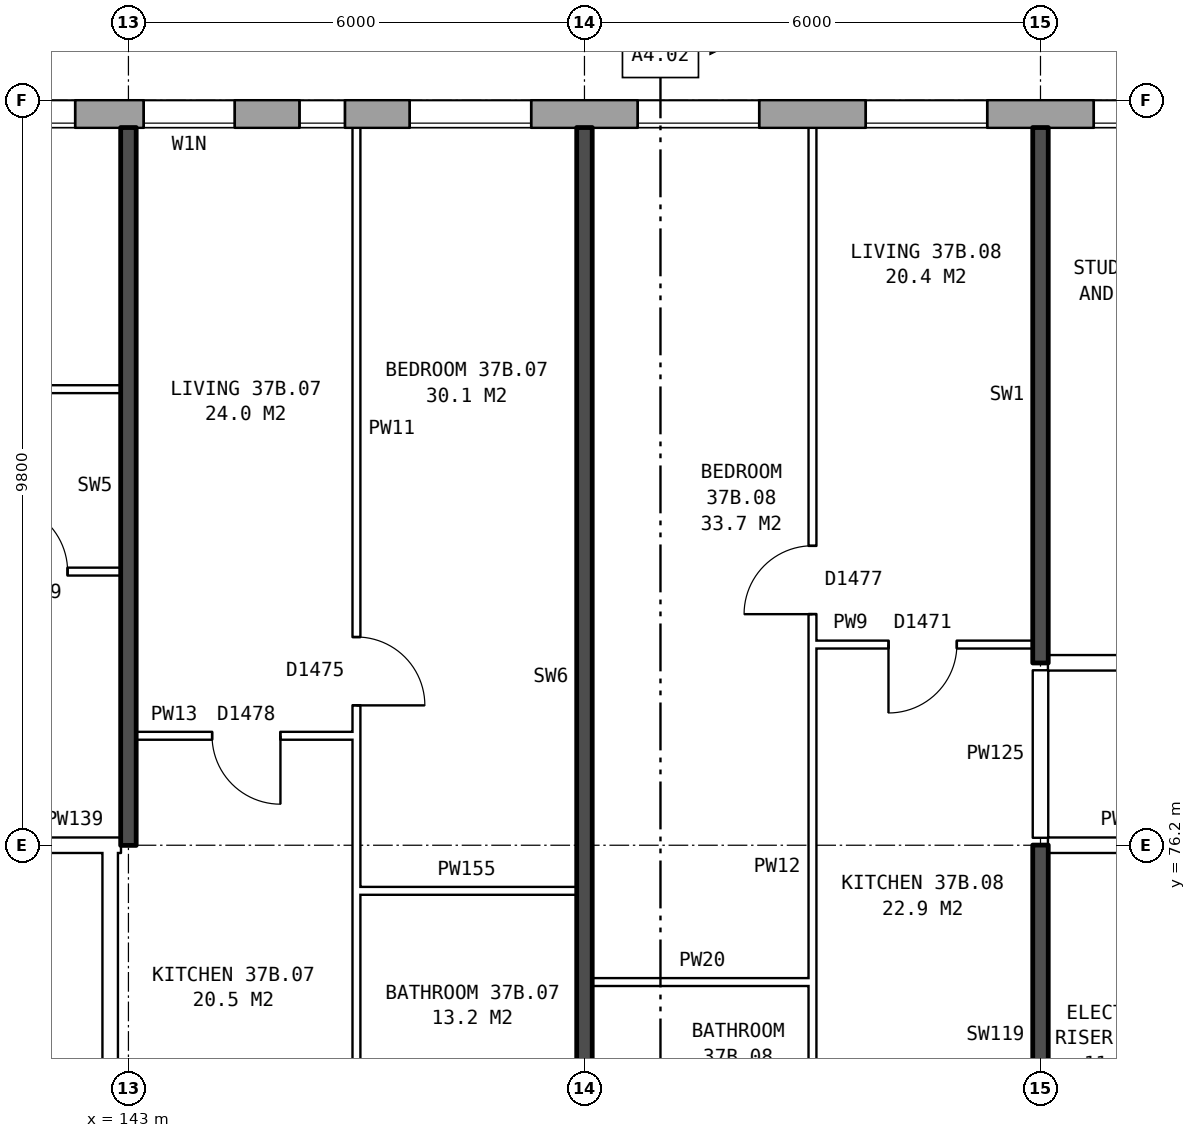
"""IFC4 building model, lengths in metres.
Left out: names, types, materials, properties, quantities, classifications, styles, units other than length and angle.
Written with IfcOpenShell. Run it as: python <this file> out.ifc"""

import sys

from ifc_helpers import new_model, si_unit, direction, frame, frame_2d, origin, place, context, subcontext, project, spatial, rectangle, extrude, element, fill, save


model = new_model("IFC4")
c1 = context("Model", 3, precision=1e-05, world=origin(), true_north=direction((0.0, 1.0)))
c2 = subcontext(c1, "Body", "Model", "MODEL_VIEW")
j1 = project(units=[si_unit("LENGTHUNIT", "METRE"), si_unit("PLANEANGLEUNIT", "RADIAN")], contexts=[c1])
p1 = place(None, origin())
s1 = spatial("IfcSite", under=j1, at=p1, CompositionType="ELEMENT")
p2 = place(p1, origin())
s2 = spatial("IfcBuilding", under=s1, at=p2, CompositionType="ELEMENT")
p3 = place(p2, frame((0.0, 0.0, 133.0)))
s3 = spatial("IfcBuildingStorey", under=s2, at=p3, CompositionType="ELEMENT", Elevation=133.0)
p4 = place(p3, frame((169.675, 85.82, 0.0), z_axis=(0.0, 0.0, 1.0), x_axis=(-1.0, 0.0, 0.0)))
e1 = element("IfcWall", 1, at=p4, inside=s3, PredefinedType="STANDARD", context=c2, shape_type="SweptSolid", body=[
    extrude(rectangle(XDim=35.601, YDim=0.36, at=frame_2d((17.8, 0.0))), origin(), (0.0, 0.0, 1.0), 2.85),
])
p5 = place(p4, frame((0.375, 0.0, 0.8)))
e2 = element("IfcOpeningElement", 2, at=p5, cuts=e1, PredefinedType="OPENING", context=c2, shape_type="SweptSolid", body=[
    extrude(rectangle(XDim=1.6, YDim=1.8, at=frame_2d((0.8, 0.9))), frame((0.0, 0.19, 0.0), z_axis=(0.0, -1.0, 0.0), x_axis=(1.0, 0.0, 0.0)), (0.0, 0.0, 1.0), 0.38),
])
p6 = place(p4, frame((3.375, 0.0, 0.8)))
e3 = element("IfcOpeningElement", 3, at=p6, cuts=e1, PredefinedType="OPENING", context=c2, shape_type="SweptSolid", body=[
    extrude(rectangle(XDim=1.6, YDim=1.8, at=frame_2d((0.8, 0.9))), frame((0.0, 0.19, 0.0), z_axis=(0.0, -1.0, 0.0), x_axis=(1.0, 0.0, 0.0)), (0.0, 0.0, 1.0), 0.38),
])
p7 = place(p4, frame((6.375, 0.0, 0.8)))
e4 = element("IfcOpeningElement", 4, at=p7, cuts=e1, PredefinedType="OPENING", context=c2, shape_type="SweptSolid", body=[
    extrude(rectangle(XDim=1.6, YDim=1.8, at=frame_2d((0.8, 0.9))), frame((0.0, 0.19, 0.0), z_axis=(0.0, -1.0, 0.0), x_axis=(1.0, 0.0, 0.0)), (0.0, 0.0, 1.0), 0.38),
])
p8 = place(p4, frame((8.875, 0.0, 0.8)))
e5 = element("IfcOpeningElement", 5, at=p8, cuts=e1, PredefinedType="OPENING", context=c2, shape_type="SweptSolid", body=[
    extrude(rectangle(XDim=0.8, YDim=1.8, at=frame_2d((0.4, 0.9))), frame((0.0, 0.19, 0.0), z_axis=(0.0, -1.0, 0.0), x_axis=(1.0, 0.0, 0.0)), (0.0, 0.0, 1.0), 0.38),
])
p9 = place(p4, frame((12.375, 0.0, 0.8)))
e6 = element("IfcOpeningElement", 6, at=p9, cuts=e1, PredefinedType="OPENING", context=c2, shape_type="SweptSolid", body=[
    extrude(rectangle(XDim=1.6, YDim=1.8, at=frame_2d((0.8, 0.9))), frame((0.0, 0.19, 0.0), z_axis=(0.0, -1.0, 0.0), x_axis=(1.0, 0.0, 0.0)), (0.0, 0.0, 1.0), 0.38),
])
p10 = place(p4, frame((15.375, 0.0, 0.8)))
e7 = element("IfcOpeningElement", 7, at=p10, cuts=e1, PredefinedType="OPENING", context=c2, shape_type="SweptSolid", body=[
    extrude(rectangle(XDim=1.6, YDim=1.8, at=frame_2d((0.8, 0.9))), frame((0.0, 0.19, 0.0), z_axis=(0.0, -1.0, 0.0), x_axis=(1.0, 0.0, 0.0)), (0.0, 0.0, 1.0), 0.38),
])
p11 = place(p4, frame((18.375, 0.0, 0.8)))
e8 = element("IfcOpeningElement", 8, at=p11, cuts=e1, PredefinedType="OPENING", context=c2, shape_type="SweptSolid", body=[
    extrude(rectangle(XDim=1.6, YDim=1.8, at=frame_2d((0.8, 0.9))), frame((0.0, 0.19, 0.0), z_axis=(0.0, -1.0, 0.0), x_axis=(1.0, 0.0, 0.0)), (0.0, 0.0, 1.0), 0.38),
])
p12 = place(p4, frame((21.375, 0.0, 0.8)))
e9 = element("IfcOpeningElement", 9, at=p12, cuts=e1, PredefinedType="OPENING", context=c2, shape_type="SweptSolid", body=[
    extrude(rectangle(XDim=1.6, YDim=1.8, at=frame_2d((0.8, 0.9))), frame((0.0, 0.19, 0.0), z_axis=(0.0, -1.0, 0.0), x_axis=(1.0, 0.0, 0.0)), (0.0, 0.0, 1.0), 0.38),
])
p13 = place(p4, frame((23.825, 0.0, 0.15)))
e10 = element("IfcOpeningElement", 10, at=p13, cuts=e1, PredefinedType="OPENING", context=c2, shape_type="SweptSolid", body=[
    extrude(rectangle(XDim=0.6, YDim=0.9, at=frame_2d((0.3, 0.45))), frame((0.0, 0.19, 0.0), z_axis=(0.0, -1.0, 0.0), x_axis=(1.0, 0.0, 0.0)), (0.0, 0.0, 1.0), 0.38),
])
p14 = place(p4, frame((27.375, 0.0, 0.8)))
e11 = element("IfcOpeningElement", 11, at=p14, cuts=e1, PredefinedType="OPENING", context=c2, shape_type="SweptSolid", body=[
    extrude(rectangle(XDim=1.6, YDim=1.8, at=frame_2d((0.8, 0.9))), frame((0.0, 0.19, 0.0), z_axis=(0.0, -1.0, 0.0), x_axis=(1.0, 0.0, 0.0)), (0.0, 0.0, 1.0), 0.38),
])
p15 = place(p4, frame((30.375, 0.0, 0.8)))
e12 = element("IfcOpeningElement", 12, at=p15, cuts=e1, PredefinedType="OPENING", context=c2, shape_type="SweptSolid", body=[
    extrude(rectangle(XDim=1.6, YDim=1.8, at=frame_2d((0.8, 0.9))), frame((0.0, 0.19, 0.0), z_axis=(0.0, -1.0, 0.0), x_axis=(1.0, 0.0, 0.0)), (0.0, 0.0, 1.0), 0.38),
])
p16 = place(p4, frame((33.375, 0.0, 0.8)))
e13 = element("IfcOpeningElement", 13, at=p16, cuts=e1, PredefinedType="OPENING", context=c2, shape_type="SweptSolid", body=[
    extrude(rectangle(XDim=1.6, YDim=1.8, at=frame_2d((0.8, 0.9))), frame((0.0, 0.19, 0.0), z_axis=(0.0, -1.0, 0.0), x_axis=(1.0, 0.0, 0.0)), (0.0, 0.0, 1.0), 0.38),
])
p17 = place(p4, frame((9.975, 0.0, 1.7)))
e14 = element("IfcOpeningElement", 14, at=p17, cuts=e1, PredefinedType="OPENING", context=c2, shape_type="SweptSolid", body=[
    extrude(rectangle(XDim=0.6, YDim=0.9, at=frame_2d((0.3, 0.45))), frame((0.0, 0.19, 0.0), z_axis=(0.0, -1.0, 0.0), x_axis=(1.0, 0.0, 0.0)), (0.0, 0.0, 1.0), 0.38),
])
p18 = place(p4, frame((25.275, 0.0, 1.35)))
e15 = element("IfcOpeningElement", 15, at=p18, cuts=e1, PredefinedType="OPENING", context=c2, shape_type="SweptSolid", body=[
    extrude(rectangle(XDim=1.2, YDim=1.2, at=frame_2d((0.6, 0.6))), frame((0.0, 0.19, 0.0), z_axis=(0.0, -1.0, 0.0), x_axis=(1.0, 0.0, 0.0)), (0.0, 0.0, 1.0), 0.38),
])
p19 = place(p3, frame((142.76, 63.9, 0.0), z_axis=(0.0, 0.0, 1.0), x_axis=(0.0, 1.0, 0.0)))
e16 = element("IfcWall", 16, at=p19, inside=s3, PredefinedType="PARTITIONING", context=c2, shape_type="SweptSolid", body=[
    extrude(rectangle(XDim=12.2, YDim=0.2, at=frame_2d((6.1, 0.0))), origin(), (0.0, 0.0, 1.0), 2.85),
])
p20 = place(p19, frame((5.1, 0.0, 0.0)))
e17 = element("IfcOpeningElement", 17, at=p20, cuts=e16, PredefinedType="OPENING", context=c2, shape_type="SweptSolid", body=[
    extrude(rectangle(XDim=2.0, YDim=2.1, at=frame_2d((1.0, 1.05))), frame((0.0, 0.11, 0.0), z_axis=(0.0, -1.0, 0.0), x_axis=(1.0, 0.0, 0.0)), (0.0, 0.0, 1.0), 0.22),
])
for number, where, z_axis, x_axis in (
    (18, (149.1, 74.4, 0.0), (0.0, 0.0, 1.0), (1.0, 0.0, 0.0)),
    (19, (146.0, 75.6, 0.0), (0.0, 0.0, 1.0), (1.0, 0.0, 0.0)),
):
    element("IfcWall", number, at=place(p3, frame(where, z_axis=z_axis, x_axis=x_axis)), inside=s3, PredefinedType="PARTITIONING", context=c2, shape_type="SweptSolid", body=[
        extrude(rectangle(XDim=2.9, YDim=0.1, at=frame_2d((1.45, 0.0))), origin(), (0.0, 0.0, 1.0), 2.85),
    ])
p21 = place(p3, frame((139.76, 76.2, 0.0), z_axis=(0.0, 0.0, 1.0), x_axis=(1.0, 0.0, 0.0)))
e20 = element("IfcWall", 20, at=p21, inside=s3, PredefinedType="PARTITIONING", context=c2, shape_type="SweptSolid", body=[
    extrude(rectangle(XDim=3.0, YDim=0.2, at=frame_2d((1.5, 0.0))), origin(), (0.0, 0.0, 1.0), 2.85),
])
p22 = place(p21, frame((1.0, 0.0, 0.0)))
e21 = element("IfcOpeningElement", 21, at=p22, cuts=e20, PredefinedType="OPENING", context=c2, shape_type="SweptSolid", body=[
    extrude(rectangle(XDim=1.0, YDim=2.1, at=frame_2d((0.5, 1.05))), frame((0.0, 0.11, 0.0), z_axis=(0.0, -1.0, 0.0), x_axis=(1.0, 0.0, 0.0)), (0.0, 0.0, 1.0), 0.22),
])
p23 = place(p3, frame((142.76, 76.2, 0.0), z_axis=(0.0, 0.0, 1.0), x_axis=(1.0, 0.0, 0.0)))
e22 = element("IfcWall", 22, at=p23, inside=s3, PredefinedType="PARTITIONING", context=c2, shape_type="SweptSolid", body=[
    extrude(rectangle(XDim=0.14, YDim=0.2, at=frame_2d((0.07, 0.0))), origin(), (0.0, 0.0, 1.0), 2.85),
])
p24 = place(p3, frame((155.1, 76.2, 0.0), z_axis=(0.0, 0.0, 1.0), x_axis=(1.0, 0.0, 0.0)))
e23 = element("IfcWall", 23, at=p24, inside=s3, PredefinedType="PARTITIONING", context=c2, shape_type="SweptSolid", body=[
    extrude(rectangle(XDim=2.14, YDim=0.2, at=frame_2d((1.07, 0.0))), origin(), (0.0, 0.0, 1.0), 2.85),
])
p25 = place(p3, frame((143.1, 77.64, 0.0), z_axis=(0.0, 0.0, 1.0), x_axis=(1.0, 0.0, 0.0)))
e24 = element("IfcWall", 24, at=p25, inside=s3, PredefinedType="PARTITIONING", context=c2, shape_type="SweptSolid", body=[
    extrude(rectangle(XDim=2.9, YDim=0.1, at=frame_2d((1.45, 0.0))), origin(), (0.0, 0.0, 1.0), 2.85),
])
p26 = place(p25, frame((1.0, 0.0, 0.0)))
e25 = element("IfcOpeningElement", 25, at=p26, cuts=e24, PredefinedType="OPENING", context=c2, shape_type="SweptSolid", body=[
    extrude(rectangle(XDim=0.9, YDim=2.1, at=frame_2d((0.45, 1.05))), frame((0.0, 0.06, 0.0), z_axis=(0.0, -1.0, 0.0), x_axis=(1.0, 0.0, 0.0)), (0.0, 0.0, 1.0), 0.12),
])
p27 = place(p3, frame((155.1, 78.6, 0.0), z_axis=(0.0, 0.0, 1.0), x_axis=(1.0, 0.0, 0.0)))
e26 = element("IfcWall", 26, at=p27, inside=s3, PredefinedType="PARTITIONING", context=c2, shape_type="SweptSolid", body=[
    extrude(rectangle(XDim=17.29, YDim=0.2, at=frame_2d((8.645, 0.0))), origin(), (0.0, 0.0, 1.0), 2.85),
])
p28 = place(p27, frame((1.45, 0.0, 0.0)))
e27 = element("IfcOpeningElement", 27, at=p28, cuts=e26, PredefinedType="OPENING", context=c2, shape_type="SweptSolid", body=[
    extrude(rectangle(XDim=1.0, YDim=2.1, at=frame_2d((0.5, 1.05))), frame((0.0, 0.11, 0.0), z_axis=(0.0, -1.0, 0.0), x_axis=(1.0, 0.0, 0.0)), (0.0, 0.0, 1.0), 0.22),
])
p29 = place(p27, frame((8.4, 0.0, 0.0)))
e28 = element("IfcOpeningElement", 28, at=p29, cuts=e26, PredefinedType="OPENING", context=c2, shape_type="SweptSolid", body=[
    extrude(rectangle(XDim=1.0, YDim=2.1, at=frame_2d((0.5, 1.05))), frame((0.0, 0.11, 0.0), z_axis=(0.0, -1.0, 0.0), x_axis=(1.0, 0.0, 0.0)), (0.0, 0.0, 1.0), 0.22),
])
p30 = place(p3, frame((152.0, 78.84, 0.0), z_axis=(0.0, 0.0, 1.0), x_axis=(1.0, 0.0, 0.0)))
e29 = element("IfcWall", 29, at=p30, inside=s3, PredefinedType="PARTITIONING", context=c2, shape_type="SweptSolid", body=[
    extrude(rectangle(XDim=2.9, YDim=0.1, at=frame_2d((1.45, 0.0))), origin(), (0.0, 0.0, 1.0), 2.85),
])
p31 = place(p30, frame((1.0, 0.0, 0.0)))
e30 = element("IfcOpeningElement", 30, at=p31, cuts=e29, PredefinedType="OPENING", context=c2, shape_type="SweptSolid", body=[
    extrude(rectangle(XDim=0.9, YDim=2.1, at=frame_2d((0.45, 1.05))), frame((0.0, 0.06, 0.0), z_axis=(0.0, -1.0, 0.0), x_axis=(1.0, 0.0, 0.0)), (0.0, 0.0, 1.0), 0.12),
])
p32 = place(p3, frame((137.1, 79.8, 0.0), z_axis=(0.0, 0.0, 1.0), x_axis=(1.0, 0.0, 0.0)))
e31 = element("IfcWall", 31, at=p32, inside=s3, PredefinedType="PARTITIONING", context=c2, shape_type="SweptSolid", body=[
    extrude(rectangle(XDim=5.8, YDim=0.1, at=frame_2d((2.9, 0.0))), origin(), (0.0, 0.0, 1.0), 2.85),
])
p33 = place(p32, frame((1.3, 0.0, 0.0)))
e32 = element("IfcOpeningElement", 32, at=p33, cuts=e31, PredefinedType="OPENING", context=c2, shape_type="SweptSolid", body=[
    extrude(rectangle(XDim=0.9, YDim=2.1, at=frame_2d((0.45, 1.05))), frame((0.0, 0.06, 0.0), z_axis=(0.0, -1.0, 0.0), x_axis=(1.0, 0.0, 0.0)), (0.0, 0.0, 1.0), 0.12),
])
p34 = place(p32, frame((4.2, 0.0, 0.0)))
e33 = element("IfcOpeningElement", 33, at=p34, cuts=e31, PredefinedType="OPENING", context=c2, shape_type="SweptSolid", body=[
    extrude(rectangle(XDim=0.9, YDim=2.1, at=frame_2d((0.45, 1.05))), frame((0.0, 0.06, 0.0), z_axis=(0.0, -1.0, 0.0), x_axis=(1.0, 0.0, 0.0)), (0.0, 0.0, 1.0), 0.12),
])
p35 = place(p3, frame((140.6, 82.2, 0.0), z_axis=(0.0, 0.0, 1.0), x_axis=(1.0, 0.0, 0.0)))
e34 = element("IfcWall", 34, at=p35, inside=s3, PredefinedType="PARTITIONING", context=c2, shape_type="SweptSolid", body=[
    extrude(rectangle(XDim=2.3, YDim=0.1, at=frame_2d((1.15, 0.0))), origin(), (0.0, 0.0, 1.0), 2.85),
])
p36 = place(p3, frame((143.0, 76.2, 0.0), z_axis=(0.0, 0.0, 1.0), x_axis=(0.0, 1.0, 0.0)))
e35 = element("IfcWall", 35, at=p36, inside=s3, PredefinedType="SOLIDWALL", context=c2, shape_type="SweptSolid", body=[
    extrude(rectangle(XDim=9.44, YDim=0.2, at=frame_2d((4.72, 0.0))), origin(), (0.0, 0.0, 1.0), 2.85),
])
p37 = place(p3, frame((146.0, 71.3, 0.0), z_axis=(0.0, 0.0, 1.0), x_axis=(0.0, 1.0, 0.0)))
e36 = element("IfcWall", 36, at=p37, inside=s3, PredefinedType="PARTITIONING", context=c2, shape_type="SweptSolid", body=[
    extrude(rectangle(XDim=14.34, YDim=0.1, at=frame_2d((7.17, 0.0))), origin(), (0.0, 0.0, 1.0), 2.85),
])
p38 = place(p37, frame((6.74, 0.0, 0.0)))
e37 = element("IfcOpeningElement", 37, at=p38, cuts=e36, PredefinedType="OPENING", context=c2, shape_type="SweptSolid", body=[
    extrude(rectangle(XDim=0.9, YDim=2.1, at=frame_2d((0.45, 1.05))), frame((0.0, 0.06, 0.0), z_axis=(0.0, -1.0, 0.0), x_axis=(1.0, 0.0, 0.0)), (0.0, 0.0, 1.0), 0.12),
])
p39 = place(p37, frame((0.4, 0.0, 0.0)))
e38 = element("IfcOpeningElement", 38, at=p39, cuts=e36, PredefinedType="OPENING", context=c2, shape_type="SweptSolid", body=[
    extrude(rectangle(XDim=0.9, YDim=2.1, at=frame_2d((0.45, 1.05))), frame((0.0, 0.06, 0.0), z_axis=(0.0, -1.0, 0.0), x_axis=(1.0, 0.0, 0.0)), (0.0, 0.0, 1.0), 0.12),
])
p40 = place(p3, frame((149.0, 71.2, 0.0), z_axis=(0.0, 0.0, 1.0), x_axis=(0.0, 1.0, 0.0)))
e39 = element("IfcWall", 39, at=p40, inside=s3, PredefinedType="SOLIDWALL", context=c2, shape_type="SweptSolid", body=[
    extrude(rectangle(XDim=14.44, YDim=0.2, at=frame_2d((7.22, 0.0))), origin(), (0.0, 0.0, 1.0), 2.85),
])
p41 = place(p3, frame((152.0, 71.3, 0.0), z_axis=(0.0, 0.0, 1.0), x_axis=(0.0, 1.0, 0.0)))
e40 = element("IfcWall", 40, at=p41, inside=s3, PredefinedType="PARTITIONING", context=c2, shape_type="SweptSolid", body=[
    extrude(rectangle(XDim=14.34, YDim=0.1, at=frame_2d((7.17, 0.0))), origin(), (0.0, 0.0, 1.0), 2.85),
])
p42 = place(p41, frame((7.94, 0.0, 0.0)))
e41 = element("IfcOpeningElement", 41, at=p42, cuts=e40, PredefinedType="OPENING", context=c2, shape_type="SweptSolid", body=[
    extrude(rectangle(XDim=0.9, YDim=2.1, at=frame_2d((0.45, 1.05))), frame((0.0, 0.06, 0.0), z_axis=(0.0, -1.0, 0.0), x_axis=(1.0, 0.0, 0.0)), (0.0, 0.0, 1.0), 0.12),
])
p43 = place(p41, frame((0.4, 0.0, 0.0)))
e42 = element("IfcOpeningElement", 42, at=p43, cuts=e40, PredefinedType="OPENING", context=c2, shape_type="SweptSolid", body=[
    extrude(rectangle(XDim=0.9, YDim=2.1, at=frame_2d((0.45, 1.05))), frame((0.0, 0.06, 0.0), z_axis=(0.0, -1.0, 0.0), x_axis=(1.0, 0.0, 0.0)), (0.0, 0.0, 1.0), 0.12),
])
p44 = place(p3, frame((155.0, 71.2, 0.0), z_axis=(0.0, 0.0, 1.0), x_axis=(0.0, 1.0, 0.0)))
e43 = element("IfcWall", 43, at=p44, inside=s3, PredefinedType="SOLIDWALL", context=c2, shape_type="SweptSolid", body=[
    extrude(rectangle(XDim=5.0, YDim=0.2, at=frame_2d((2.5, 0.0))), origin(), (0.0, 0.0, 1.0), 2.85),
])
p45 = place(p3, frame((155.0, 76.3, 0.0), z_axis=(0.0, 0.0, 1.0), x_axis=(0.0, 1.0, 0.0)))
e44 = element("IfcWall", 44, at=p45, inside=s3, PredefinedType="PARTITIONING", context=c2, shape_type="SweptSolid", body=[
    extrude(rectangle(XDim=2.2, YDim=0.2, at=frame_2d((1.1, 0.0))), origin(), (0.0, 0.0, 1.0), 2.85),
])
p46 = place(p3, frame((155.0, 78.6, 0.0), z_axis=(0.0, 0.0, 1.0), x_axis=(0.0, 1.0, 0.0)))
e45 = element("IfcWall", 45, at=p46, inside=s3, PredefinedType="SOLIDWALL", context=c2, shape_type="SweptSolid", body=[
    extrude(rectangle(XDim=7.04, YDim=0.2, at=frame_2d((3.52, 0.0))), origin(), (0.0, 0.0, 1.0), 2.85),
])
p47 = place(p9, origin())
e46 = element("IfcWindow", 46, at=p47, inside=s3, PartitioningType="SINGLE_PANEL", PredefinedType="WINDOW", context=c2, shape_type="SweptSolid", body=[
    extrude(rectangle(XDim=1.6, YDim=1.8, at=frame_2d((0.8, 0.9))), frame((0.0, 0.15, 0.0), z_axis=(0.0, -1.0, 0.0), x_axis=(1.0, 0.0, 0.0)), (0.0, 0.0, 1.0), 0.06),
])
fill(e6, e46)
p48 = place(p10, origin())
e47 = element("IfcWindow", 47, at=p48, inside=s3, PartitioningType="SINGLE_PANEL", PredefinedType="WINDOW", context=c2, shape_type="SweptSolid", body=[
    extrude(rectangle(XDim=1.6, YDim=1.8, at=frame_2d((0.8, 0.9))), frame((0.0, 0.15, 0.0), z_axis=(0.0, -1.0, 0.0), x_axis=(1.0, 0.0, 0.0)), (0.0, 0.0, 1.0), 0.06),
])
fill(e7, e47)
p49 = place(p11, origin())
e48 = element("IfcWindow", 48, at=p49, inside=s3, PartitioningType="SINGLE_PANEL", PredefinedType="WINDOW", context=c2, shape_type="SweptSolid", body=[
    extrude(rectangle(XDim=1.6, YDim=1.8, at=frame_2d((0.8, 0.9))), frame((0.0, 0.15, 0.0), z_axis=(0.0, -1.0, 0.0), x_axis=(1.0, 0.0, 0.0)), (0.0, 0.0, 1.0), 0.06),
])
fill(e8, e48)
p50 = place(p12, origin())
e49 = element("IfcWindow", 49, at=p50, inside=s3, PartitioningType="SINGLE_PANEL", PredefinedType="WINDOW", context=c2, shape_type="SweptSolid", body=[
    extrude(rectangle(XDim=1.6, YDim=1.8, at=frame_2d((0.8, 0.9))), frame((0.0, 0.15, 0.0), z_axis=(0.0, -1.0, 0.0), x_axis=(1.0, 0.0, 0.0)), (0.0, 0.0, 1.0), 0.06),
])
fill(e9, e49)
p51 = place(p13, origin())
e50 = element("IfcWindow", 50, at=p51, inside=s3, PartitioningType="SINGLE_PANEL", PredefinedType="WINDOW", context=c2, shape_type="SweptSolid", body=[
    extrude(rectangle(XDim=0.6, YDim=0.9, at=frame_2d((0.3, 0.45))), frame((0.0, 0.15, 0.0), z_axis=(0.0, -1.0, 0.0), x_axis=(1.0, 0.0, 0.0)), (0.0, 0.0, 1.0), 0.06),
])
fill(e10, e50)
p52 = place(p14, origin())
e51 = element("IfcWindow", 51, at=p52, inside=s3, PartitioningType="SINGLE_PANEL", PredefinedType="WINDOW", context=c2, shape_type="SweptSolid", body=[
    extrude(rectangle(XDim=1.6, YDim=1.8, at=frame_2d((0.8, 0.9))), frame((0.0, 0.15, 0.0), z_axis=(0.0, -1.0, 0.0), x_axis=(1.0, 0.0, 0.0)), (0.0, 0.0, 1.0), 0.06),
])
fill(e11, e51)
p53 = place(p34, origin())
e52 = element("IfcDoor", 52, at=p53, inside=s3, OperationType="SINGLE_SWING_LEFT", PredefinedType="DOOR", context=c2, shape_type="SweptSolid", body=[
    extrude(rectangle(XDim=0.9, YDim=2.1, at=frame_2d((0.45, 1.05))), frame((0.0, 0.025, 0.0), z_axis=(0.0, -1.0, 0.0), x_axis=(1.0, 0.0, 0.0)), (0.0, 0.0, 1.0), 0.05),
])
fill(e33, e52)
p54 = place(p38, frame((0.9, 0.0, 0.0), z_axis=(0.0, 0.0, 1.0), x_axis=(-1.0, 0.0, 0.0)))
e53 = element("IfcDoor", 53, at=p54, inside=s3, OperationType="SINGLE_SWING_RIGHT", PredefinedType="DOOR", context=c2, shape_type="SweptSolid", body=[
    extrude(rectangle(XDim=0.9, YDim=2.1, at=frame_2d((0.45, 1.05))), frame((0.0, 0.025, 0.0), z_axis=(0.0, -1.0, 0.0), x_axis=(1.0, 0.0, 0.0)), (0.0, 0.0, 1.0), 0.05),
])
fill(e37, e53)
p55 = place(p26, frame((0.9, 0.0, 0.0), z_axis=(0.0, 0.0, 1.0), x_axis=(-1.0, 0.0, 0.0)))
e54 = element("IfcDoor", 54, at=p55, inside=s3, OperationType="SINGLE_SWING_LEFT", PredefinedType="DOOR", context=c2, shape_type="SweptSolid", body=[
    extrude(rectangle(XDim=0.9, YDim=2.1, at=frame_2d((0.45, 1.05))), frame((0.0, 0.025, 0.0), z_axis=(0.0, -1.0, 0.0), x_axis=(1.0, 0.0, 0.0)), (0.0, 0.0, 1.0), 0.05),
])
fill(e25, e54)
p56 = place(p42, origin())
e55 = element("IfcDoor", 55, at=p56, inside=s3, OperationType="SINGLE_SWING_LEFT", PredefinedType="DOOR", context=c2, shape_type="SweptSolid", body=[
    extrude(rectangle(XDim=0.9, YDim=2.1, at=frame_2d((0.45, 1.05))), frame((0.0, 0.025, 0.0), z_axis=(0.0, -1.0, 0.0), x_axis=(1.0, 0.0, 0.0)), (0.0, 0.0, 1.0), 0.05),
])
fill(e41, e55)
p57 = place(p31, frame((0.9, 0.0, 0.0), z_axis=(0.0, 0.0, 1.0), x_axis=(-1.0, 0.0, 0.0)))
e56 = element("IfcDoor", 56, at=p57, inside=s3, OperationType="SINGLE_SWING_RIGHT", PredefinedType="DOOR", context=c2, shape_type="SweptSolid", body=[
    extrude(rectangle(XDim=0.9, YDim=2.1, at=frame_2d((0.45, 1.05))), frame((0.0, 0.025, 0.0), z_axis=(0.0, -1.0, 0.0), x_axis=(1.0, 0.0, 0.0)), (0.0, 0.0, 1.0), 0.05),
])
fill(e30, e56)
p58 = place(p18, origin())
e57 = element("IfcWindow", 57, at=p58, inside=s3, PartitioningType="SINGLE_PANEL", PredefinedType="WINDOW", context=c2, shape_type="SweptSolid", body=[
    extrude(rectangle(XDim=1.2, YDim=1.2, at=frame_2d((0.6, 0.6))), frame((0.0, 0.15, 0.0), z_axis=(0.0, -1.0, 0.0), x_axis=(1.0, 0.0, 0.0)), (0.0, 0.0, 1.0), 0.06),
])
fill(e15, e57)
save(model, sys.argv[1])
